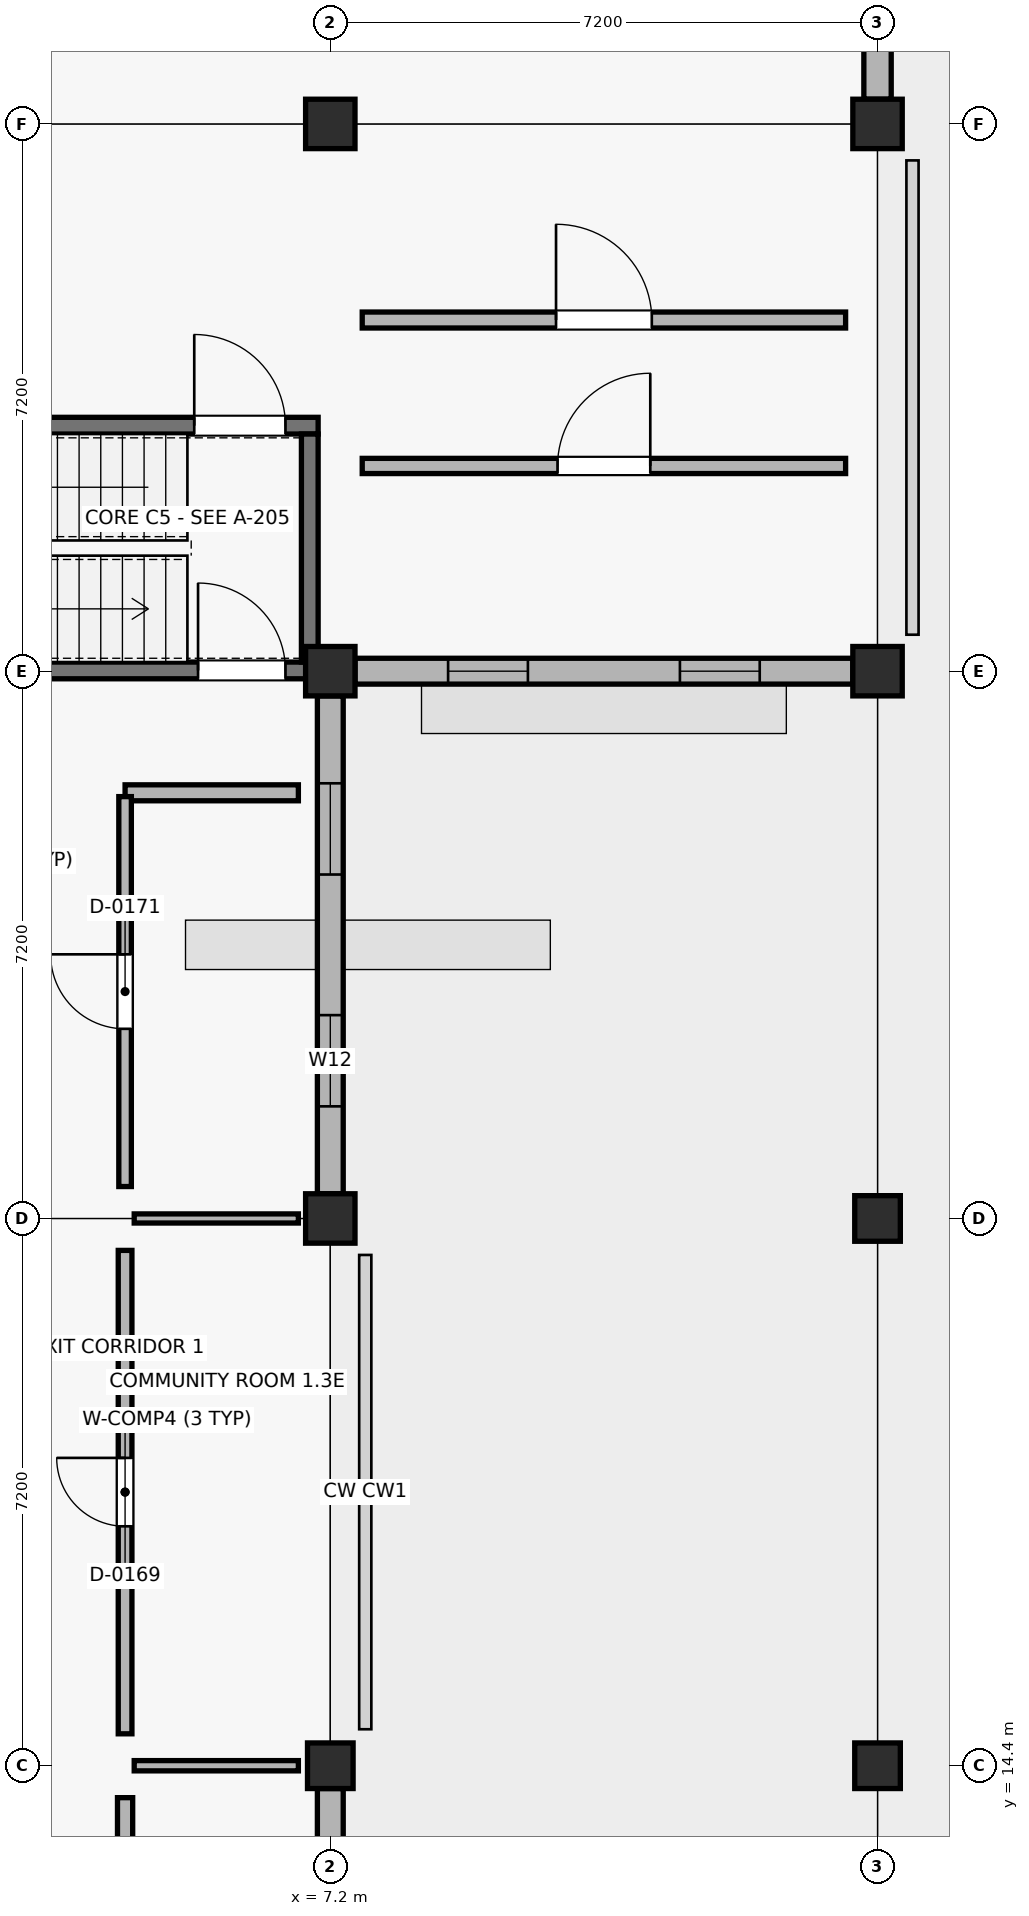
"""IFC4 building model, lengths in metres.
Left out: names, types, materials, properties, quantities, classifications, styles, units other than length and angle.
Written with IfcOpenShell. Run it as: python <this file> out.ifc"""

import sys

from ifc_helpers import new_model, si_unit, direction, frame, frame_2d, origin, origin_2d, place, context, subcontext, project, spatial, rectangle, extrude, element, fill, save


model = new_model("IFC4")
c1 = context("Model", 3, precision=1e-05, world=origin(), true_north=direction((0.0, 1.0)))
c2 = subcontext(c1, "Body", "Model", "MODEL_VIEW")
j1 = project(units=[si_unit("LENGTHUNIT", "METRE"), si_unit("PLANEANGLEUNIT", "RADIAN")], contexts=[c1])
p1 = place(None, origin())
s1 = spatial("IfcSite", under=j1, at=p1, CompositionType="ELEMENT")
p2 = place(p1, origin())
s2 = spatial("IfcBuilding", under=s1, at=p2, CompositionType="ELEMENT")
p3 = place(p2, origin())
s3 = spatial("IfcBuildingStorey", under=s2, at=p3, CompositionType="ELEMENT", Elevation=0.0)
p4 = place(p3, frame((7.2, 14.4, -0.25), z_axis=(0.0, 0.0, 1.0), x_axis=(1.0, 0.0, 0.0)))
e1 = element("IfcColumn", 1, at=p4, inside=s3, PredefinedType="COLUMN", context=c2, shape_type="SweptSolid", body=[
    extrude(rectangle(XDim=0.6, YDim=0.6, at=origin_2d()), origin(), (0.0, 0.0, 1.0), 4.75),
])
for number, where, z_axis, x_axis in (
    (2, (7.2, 21.6, -0.25), (0.0, 0.0, 1.0), (1.0, 0.0, 0.0)),
    (3, (7.2, 28.8, -0.25), (0.0, 0.0, 1.0), (1.0, 0.0, 0.0)),
    (4, (7.2, 36.0, -0.25), (0.0, 0.0, 1.0), (1.0, 0.0, 0.0)),
):
    element("IfcColumn", number, at=place(p3, frame(where, z_axis=z_axis, x_axis=x_axis)), inside=s3, PredefinedType="COLUMN", context=c2, shape_type="SweptSolid", body=[
        extrude(rectangle(XDim=0.65, YDim=0.65, at=origin_2d()), origin(), (0.0, 0.0, 1.0), 4.75),
    ])
for number, where, z_axis, x_axis in (
    (5, (14.4, 14.4, -0.25), (0.0, 0.0, 1.0), (1.0, 0.0, 0.0)),
    (6, (14.4, 21.6, -0.25), (0.0, 0.0, 1.0), (1.0, 0.0, 0.0)),
):
    element("IfcColumn", number, at=place(p3, frame(where, z_axis=z_axis, x_axis=x_axis)), inside=s3, PredefinedType="COLUMN", context=c2, shape_type="SweptSolid", body=[
        extrude(rectangle(XDim=0.6, YDim=0.6, at=origin_2d()), origin(), (0.0, 0.0, 1.0), 4.75),
    ])
for number, where, z_axis, x_axis in (
    (7, (14.4, 28.8, -0.25), (0.0, 0.0, 1.0), (1.0, 0.0, 0.0)),
    (8, (14.4, 36.0, -0.25), (0.0, 0.0, 1.0), (1.0, 0.0, 0.0)),
):
    element("IfcColumn", number, at=place(p3, frame(where, z_axis=z_axis, x_axis=x_axis)), inside=s3, PredefinedType="COLUMN", context=c2, shape_type="SweptSolid", body=[
        extrude(rectangle(XDim=0.65, YDim=0.65, at=origin_2d()), origin(), (0.0, 0.0, 1.0), 4.75),
    ])
p5 = place(p3, frame((7.2, 7.5, 0.0), z_axis=(0.0, 0.0, 1.0), x_axis=(0.0, 1.0, 0.0)))
e9 = element("IfcWall", 9, at=p5, inside=s3, PredefinedType="SOLIDWALL", context=c2, shape_type="SweptSolid", body=[
    extrude(rectangle(XDim=6.6, YDim=0.34, at=frame_2d((3.3, 0.0))), origin(), (0.0, 0.0, 1.0), 3.52),
])
p6 = place(p5, frame((0.925, 0.0, 0.9)))
e10 = element("IfcOpeningElement", 10, at=p6, cuts=e9, PredefinedType="OPENING", context=c2, shape_type="SweptSolid", body=[
    extrude(rectangle(XDim=1.65, YDim=1.25, at=frame_2d((0.825, 0.625))), frame((0.0, 0.18, 0.0), z_axis=(0.0, -1.0, 0.0), x_axis=(1.0, 0.0, 0.0)), (0.0, 0.0, 1.0), 0.36),
])
p7 = place(p5, frame((4.025, 0.0, 0.9)))
e11 = element("IfcOpeningElement", 11, at=p7, cuts=e9, PredefinedType="OPENING", context=c2, shape_type="SweptSolid", body=[
    extrude(rectangle(XDim=1.65, YDim=1.25, at=frame_2d((0.825, 0.625))), frame((0.0, 0.18, 0.0), z_axis=(0.0, -1.0, 0.0), x_axis=(1.0, 0.0, 0.0)), (0.0, 0.0, 1.0), 0.36),
])
p8 = place(p3, frame((7.2, 21.925, 0.0), z_axis=(0.0, 0.0, 1.0), x_axis=(0.0, 1.0, 0.0)))
e12 = element("IfcWall", 12, at=p8, inside=s3, PredefinedType="SOLIDWALL", context=c2, shape_type="SweptSolid", body=[
    extrude(rectangle(XDim=6.55, YDim=0.34, at=frame_2d((3.275, 0.0))), origin(), (0.0, 0.0, 1.0), 3.52),
])
p9 = place(p8, frame((1.15, 0.0, 0.9)))
e13 = element("IfcOpeningElement", 13, at=p9, cuts=e12, PredefinedType="OPENING", context=c2, shape_type="SweptSolid", body=[
    extrude(rectangle(XDim=1.2, YDim=1.38, at=frame_2d((0.6, 0.69))), frame((0.0, 0.18, 0.0), z_axis=(0.0, -1.0, 0.0), x_axis=(1.0, 0.0, 0.0)), (0.0, 0.0, 1.0), 0.36),
])
p10 = place(p8, frame((4.2, 0.0, 0.9)))
e14 = element("IfcOpeningElement", 14, at=p10, cuts=e12, PredefinedType="OPENING", context=c2, shape_type="SweptSolid", body=[
    extrude(rectangle(XDim=1.2, YDim=1.38, at=frame_2d((0.6, 0.69))), frame((0.0, 0.18, 0.0), z_axis=(0.0, -1.0, 0.0), x_axis=(1.0, 0.0, 0.0)), (0.0, 0.0, 1.0), 0.36),
])
p11 = place(p3, frame((7.525, 28.8, 0.0), z_axis=(0.0, 0.0, 1.0), x_axis=(1.0, 0.0, 0.0)))
e15 = element("IfcWall", 15, at=p11, inside=s3, PredefinedType="SOLIDWALL", context=c2, shape_type="SweptSolid", body=[
    extrude(rectangle(XDim=6.55, YDim=0.34, at=frame_2d((3.275, 0.0))), origin(), (0.0, 0.0, 1.0), 3.47),
])
p12 = place(p11, frame((1.225, 0.0, 0.9)))
e16 = element("IfcOpeningElement", 16, at=p12, cuts=e15, PredefinedType="OPENING", context=c2, shape_type="SweptSolid", body=[
    extrude(rectangle(XDim=1.05, YDim=1.75, at=frame_2d((0.525, 0.875))), frame((0.0, 0.18, 0.0), z_axis=(0.0, -1.0, 0.0), x_axis=(1.0, 0.0, 0.0)), (0.0, 0.0, 1.0), 0.36),
])
p13 = place(p11, frame((4.275, 0.0, 0.9)))
e17 = element("IfcOpeningElement", 17, at=p13, cuts=e15, PredefinedType="OPENING", context=c2, shape_type="SweptSolid", body=[
    extrude(rectangle(XDim=1.05, YDim=1.75, at=frame_2d((0.525, 0.875))), frame((0.0, 0.18, 0.0), z_axis=(0.0, -1.0, 0.0), x_axis=(1.0, 0.0, 0.0)), (0.0, 0.0, 1.0), 0.36),
])
p14 = place(p3, frame((14.4, 36.325, 0.0), z_axis=(0.0, 0.0, 1.0), x_axis=(0.0, 1.0, 0.0)))
e18 = element("IfcWall", 18, at=p14, inside=s3, PredefinedType="SOLIDWALL", context=c2, shape_type="SweptSolid", body=[
    extrude(rectangle(XDim=6.55, YDim=0.36, at=frame_2d((3.275, 0.0))), origin(), (0.0, 0.0, 1.0), 3.52),
])
p15 = place(p14, frame((1.0, 0.0, 0.9)))
e19 = element("IfcOpeningElement", 19, at=p15, cuts=e18, PredefinedType="OPENING", context=c2, shape_type="SweptSolid", body=[
    extrude(rectangle(XDim=1.5, YDim=1.75, at=frame_2d((0.75, 0.875))), frame((0.0, 0.19, 0.0), z_axis=(0.0, -1.0, 0.0), x_axis=(1.0, 0.0, 0.0)), (0.0, 0.0, 1.0), 0.38),
])
p16 = place(p14, frame((4.05, 0.0, 0.9)))
e20 = element("IfcOpeningElement", 20, at=p16, cuts=e18, PredefinedType="OPENING", context=c2, shape_type="SweptSolid", body=[
    extrude(rectangle(XDim=1.5, YDim=1.75, at=frame_2d((0.75, 0.875))), frame((0.0, 0.19, 0.0), z_axis=(0.0, -1.0, 0.0), x_axis=(1.0, 0.0, 0.0)), (0.0, 0.0, 1.0), 0.38),
])
p17 = place(p3, frame((0.16, 28.81, -0.25), z_axis=(0.0, 0.0, 1.0), x_axis=(1.0, 0.0, 0.0)))
e21 = element("IfcWall", 21, at=p17, inside=s3, PredefinedType="SHEAR", context=c2, shape_type="SweptSolid", body=[
    extrude(rectangle(XDim=6.88, YDim=0.22, at=frame_2d((3.44, 0.0))), origin(), (0.0, 0.0, 1.0), 4.47),
])
p18 = place(p17, frame((5.3, 0.0, 0.25)))
e22 = element("IfcOpeningElement", 22, at=p18, cuts=e21, PredefinedType="OPENING", context=c2, shape_type="SweptSolid", body=[
    extrude(rectangle(XDim=1.15, YDim=2.15, at=frame_2d((0.575, 1.075))), frame((0.0, 0.12, 0.0), z_axis=(0.0, -1.0, 0.0), x_axis=(1.0, 0.0, 0.0)), (0.0, 0.0, 1.0), 0.24),
])
p19 = place(p3, frame((0.16, 32.03, -0.25), z_axis=(0.0, 0.0, 1.0), x_axis=(1.0, 0.0, 0.0)))
e23 = element("IfcWall", 23, at=p19, inside=s3, PredefinedType="SHEAR", context=c2, shape_type="SweptSolid", body=[
    extrude(rectangle(XDim=6.88, YDim=0.22, at=frame_2d((3.44, 0.0))), origin(), (0.0, 0.0, 1.0), 4.47),
])
p20 = place(p19, frame((5.25, 0.0, 0.25)))
e24 = element("IfcOpeningElement", 24, at=p20, cuts=e23, PredefinedType="OPENING", context=c2, shape_type="SweptSolid", body=[
    extrude(rectangle(XDim=1.2, YDim=2.15, at=frame_2d((0.6, 1.075))), frame((0.0, 0.12, 0.0), z_axis=(0.0, -1.0, 0.0), x_axis=(1.0, 0.0, 0.0)), (0.0, 0.0, 1.0), 0.24),
])
p21 = place(p3, frame((6.93, 28.92, -0.25), z_axis=(0.0, 0.0, 1.0), x_axis=(0.0, 1.0, 0.0)))
e25 = element("IfcWall", 25, at=p21, inside=s3, PredefinedType="SHEAR", context=c2, shape_type="SweptSolid", body=[
    extrude(rectangle(XDim=3.0, YDim=0.22, at=frame_2d((1.5, 0.0))), origin(), (0.0, 0.0, 1.0), 4.47),
])
p22 = place(p3, frame((4.5, 7.62, 0.0), z_axis=(0.0, 0.0, 1.0), x_axis=(0.0, 1.0, 0.0)))
e26 = element("IfcWall", 26, at=p22, inside=s3, PredefinedType="SOLIDWALL", context=c2, shape_type="SweptSolid", body=[
    extrude(rectangle(XDim=6.36, YDim=0.2, at=frame_2d((3.18, 0.0))), origin(), (0.0, 0.0, 1.0), 3.36),
])
p23 = place(p22, frame((2.45, 0.0, 0.0)))
e27 = element("IfcOpeningElement", 27, at=p23, cuts=e26, PredefinedType="OPENING", context=c2, shape_type="SweptSolid", body=[
    extrude(rectangle(XDim=1.46, YDim=2.04, at=frame_2d((0.73, 1.02))), frame((0.0, 0.11, 0.0), z_axis=(0.0, -1.0, 0.0), x_axis=(1.0, 0.0, 0.0)), (0.0, 0.0, 1.0), 0.22),
])
p24 = place(p3, frame((4.62, 14.4, 0.0), z_axis=(0.0, 0.0, 1.0), x_axis=(1.0, 0.0, 0.0)))
e28 = element("IfcWall", 28, at=p24, inside=s3, PredefinedType="PARTITIONING", context=c2, shape_type="SweptSolid", body=[
    extrude(rectangle(XDim=2.16, YDim=0.135, at=frame_2d((1.08, 0.0))), origin(), (0.0, 0.0, 1.0), 3.36),
])
p25 = place(p3, frame((4.5, 14.82, 0.0), z_axis=(0.0, 0.0, 1.0), x_axis=(0.0, 1.0, 0.0)))
e29 = element("IfcWall", 29, at=p25, inside=s3, PredefinedType="PARTITIONING", context=c2, shape_type="SweptSolid", body=[
    extrude(rectangle(XDim=6.36, YDim=0.18, at=frame_2d((3.18, 0.0))), origin(), (0.0, 0.0, 1.0), 3.36),
])
p26 = place(p25, frame((2.73, 0.0, 0.0)))
e30 = element("IfcOpeningElement", 30, at=p26, cuts=e29, PredefinedType="OPENING", context=c2, shape_type="SweptSolid", body=[
    extrude(rectangle(XDim=0.9, YDim=2.09, at=frame_2d((0.45, 1.045))), frame((0.0, 0.1, 0.0), z_axis=(0.0, -1.0, 0.0), x_axis=(1.0, 0.0, 0.0)), (0.0, 0.0, 1.0), 0.2),
])
p27 = place(p3, frame((4.62, 21.6, 0.0), z_axis=(0.0, 0.0, 1.0), x_axis=(1.0, 0.0, 0.0)))
e31 = element("IfcWall", 31, at=p27, inside=s3, PredefinedType="PARTITIONING", context=c2, shape_type="SweptSolid", body=[
    extrude(rectangle(XDim=2.16, YDim=0.12, at=frame_2d((1.08, 0.0))), origin(), (0.0, 0.0, 1.0), 3.36),
])
p28 = place(p3, frame((4.5, 27.2, 0.0), z_axis=(0.0, 0.0, 1.0), x_axis=(1.0, 0.0, 0.0)))
e32 = element("IfcWall", 32, at=p28, inside=s3, PredefinedType="PLUMBINGWALL", context=c2, shape_type="SweptSolid", body=[
    extrude(rectangle(XDim=2.28, YDim=0.21, at=frame_2d((1.14, 0.0))), origin(), (0.0, 0.0, 1.0), 3.36),
])
p29 = place(p3, frame((4.5, 22.02, 0.0), z_axis=(0.0, 0.0, 1.0), x_axis=(0.0, 1.0, 0.0)))
e33 = element("IfcWall", 33, at=p29, inside=s3, PredefinedType="PARTITIONING", context=c2, shape_type="SweptSolid", body=[
    extrude(rectangle(XDim=5.13, YDim=0.165, at=frame_2d((2.565, 0.0))), origin(), (0.0, 0.0, 1.0), 3.36),
])
p30 = place(p29, frame((2.075, 0.0, 0.0)))
e34 = element("IfcOpeningElement", 34, at=p30, cuts=e33, PredefinedType="OPENING", context=c2, shape_type="SweptSolid", body=[
    extrude(rectangle(XDim=0.98, YDim=2.09, at=frame_2d((0.49, 1.045))), frame((0.0, 0.093, 0.0), z_axis=(0.0, -1.0, 0.0), x_axis=(1.0, 0.0, 0.0)), (0.0, 0.0, 1.0), 0.185),
])
p31 = place(p3, frame((7.62, 31.5, 0.0), z_axis=(0.0, 0.0, 1.0), x_axis=(1.0, 0.0, 0.0)))
e35 = element("IfcWall", 35, at=p31, inside=s3, PredefinedType="SOLIDWALL", context=c2, shape_type="SweptSolid", body=[
    extrude(rectangle(XDim=6.36, YDim=0.2, at=frame_2d((3.18, 0.0))), origin(), (0.0, 0.0, 1.0), 3.36),
])
p32 = place(p31, frame((2.57, 0.0, 0.0)))
e36 = element("IfcOpeningElement", 36, at=p32, cuts=e35, PredefinedType="OPENING", context=c2, shape_type="SweptSolid", body=[
    extrude(rectangle(XDim=1.22, YDim=2.09, at=frame_2d((0.61, 1.045))), frame((0.0, 0.11, 0.0), z_axis=(0.0, -1.0, 0.0), x_axis=(1.0, 0.0, 0.0)), (0.0, 0.0, 1.0), 0.22),
])
p33 = place(p3, frame((7.62, 33.42, 0.0), z_axis=(0.0, 0.0, 1.0), x_axis=(1.0, 0.0, 0.0)))
e37 = element("IfcWall", 37, at=p33, inside=s3, PredefinedType="PLUMBINGWALL", context=c2, shape_type="SweptSolid", body=[
    extrude(rectangle(XDim=6.36, YDim=0.21, at=frame_2d((3.18, 0.0))), origin(), (0.0, 0.0, 1.0), 3.36),
])
p34 = place(p33, frame((2.55, 0.0, 0.0)))
e38 = element("IfcOpeningElement", 38, at=p34, cuts=e37, PredefinedType="OPENING", context=c2, shape_type="SweptSolid", body=[
    extrude(rectangle(XDim=1.26, YDim=2.09, at=frame_2d((0.63, 1.045))), frame((0.0, 0.115, 0.0), z_axis=(0.0, -1.0, 0.0), x_axis=(1.0, 0.0, 0.0)), (0.0, 0.0, 1.0), 0.23),
])
p35 = place(p9, origin())
e39 = element("IfcWindow", 39, at=p35, inside=s3, PartitioningType="SINGLE_PANEL", PredefinedType="WINDOW", context=c2, shape_type="SweptSolid", body=[
    extrude(rectangle(XDim=1.2, YDim=1.38, at=frame_2d((0.6, 0.69))), frame((0.0, 0.03, 0.0), z_axis=(0.0, -1.0, 0.0), x_axis=(1.0, 0.0, 0.0)), (0.0, 0.0, 1.0), 0.06),
])
fill(e13, e39)
p36 = place(p10, origin())
e40 = element("IfcWindow", 40, at=p36, inside=s3, PartitioningType="SINGLE_PANEL", PredefinedType="WINDOW", context=c2, shape_type="SweptSolid", body=[
    extrude(rectangle(XDim=1.2, YDim=1.38, at=frame_2d((0.6, 0.69))), frame((0.0, 0.03, 0.0), z_axis=(0.0, -1.0, 0.0), x_axis=(1.0, 0.0, 0.0)), (0.0, 0.0, 1.0), 0.06),
])
fill(e14, e40)
p37 = place(p12, origin())
e41 = element("IfcWindow", 41, at=p37, inside=s3, PartitioningType="SINGLE_PANEL", PredefinedType="WINDOW", context=c2, shape_type="SweptSolid", body=[
    extrude(rectangle(XDim=1.05, YDim=1.75, at=frame_2d((0.525, 0.875))), frame((0.0, 0.03, 0.0), z_axis=(0.0, -1.0, 0.0), x_axis=(1.0, 0.0, 0.0)), (0.0, 0.0, 1.0), 0.06),
])
fill(e16, e41)
p38 = place(p13, origin())
e42 = element("IfcWindow", 42, at=p38, inside=s3, PartitioningType="SINGLE_PANEL", PredefinedType="WINDOW", context=c2, shape_type="SweptSolid", body=[
    extrude(rectangle(XDim=1.05, YDim=1.75, at=frame_2d((0.525, 0.875))), frame((0.0, 0.03, 0.0), z_axis=(0.0, -1.0, 0.0), x_axis=(1.0, 0.0, 0.0)), (0.0, 0.0, 1.0), 0.06),
])
fill(e17, e42)
p39 = place(p20, origin())
e43 = element("IfcDoor", 43, at=p39, inside=s3, OperationType="SINGLE_SWING_LEFT", PredefinedType="DOOR", context=c2, shape_type="SweptSolid", body=[
    extrude(rectangle(XDim=1.2, YDim=2.15, at=frame_2d((0.6, 1.075))), frame((0.0, 0.025, 0.0), z_axis=(0.0, -1.0, 0.0), x_axis=(1.0, 0.0, 0.0)), (0.0, 0.0, 1.0), 0.05),
])
fill(e24, e43)
p40 = place(p18, origin())
e44 = element("IfcDoor", 44, at=p40, inside=s3, OperationType="SINGLE_SWING_LEFT", PredefinedType="DOOR", context=c2, shape_type="SweptSolid", body=[
    extrude(rectangle(XDim=1.15, YDim=2.15, at=frame_2d((0.575, 1.075))), frame((0.0, 0.025, 0.0), z_axis=(0.0, -1.0, 0.0), x_axis=(1.0, 0.0, 0.0)), (0.0, 0.0, 1.0), 0.05),
])
fill(e22, e44)
p41 = place(p26, origin())
e45 = element("IfcDoor", 45, at=p41, inside=s3, OperationType="SINGLE_SWING_RIGHT", PredefinedType="DOOR", context=c2, shape_type="SweptSolid", body=[
    extrude(rectangle(XDim=0.9, YDim=2.09, at=frame_2d((0.45, 1.045))), frame((0.0, 0.025, 0.0), z_axis=(0.0, -1.0, 0.0), x_axis=(1.0, 0.0, 0.0)), (0.0, 0.0, 1.0), 0.05),
])
fill(e30, e45)
p42 = place(p30, origin())
e46 = element("IfcDoor", 46, at=p42, inside=s3, OperationType="SINGLE_SWING_RIGHT", PredefinedType="DOOR", context=c2, shape_type="SweptSolid", body=[
    extrude(rectangle(XDim=0.98, YDim=2.09, at=frame_2d((0.49, 1.045))), frame((0.0, 0.025, 0.0), z_axis=(0.0, -1.0, 0.0), x_axis=(1.0, 0.0, 0.0)), (0.0, 0.0, 1.0), 0.05),
])
fill(e34, e46)
p43 = place(p32, origin())
e47 = element("IfcDoor", 47, at=p43, inside=s3, OperationType="SINGLE_SWING_RIGHT", PredefinedType="DOOR", context=c2, shape_type="SweptSolid", body=[
    extrude(rectangle(XDim=1.22, YDim=2.09, at=frame_2d((0.61, 1.045))), frame((0.0, 0.025, 0.0), z_axis=(0.0, -1.0, 0.0), x_axis=(1.0, 0.0, 0.0)), (0.0, 0.0, 1.0), 0.05),
])
fill(e36, e47)
p44 = place(p34, origin())
e48 = element("IfcDoor", 48, at=p44, inside=s3, OperationType="SINGLE_SWING_LEFT", PredefinedType="DOOR", context=c2, shape_type="SweptSolid", body=[
    extrude(rectangle(XDim=1.26, YDim=2.09, at=frame_2d((0.63, 1.045))), frame((0.0, 0.025, 0.0), z_axis=(0.0, -1.0, 0.0), x_axis=(1.0, 0.0, 0.0)), (0.0, 0.0, 1.0), 0.05),
])
fill(e38, e48)
save(model, sys.argv[1])
